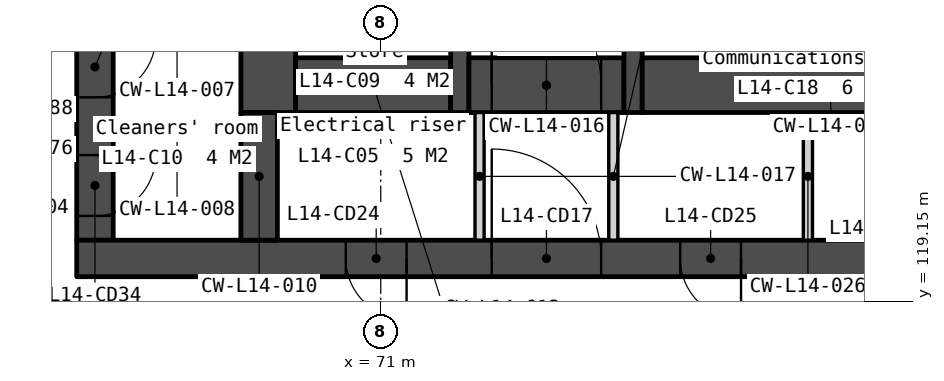
"""IFC4 building model, lengths in metres.
Left out: names, types, materials, properties, quantities, classifications, styles, units other than length and angle.
Written with IfcOpenShell. Run it as: python <this file> out.ifc"""

import sys

from ifc_helpers import new_model, si_unit, direction, frame, frame_2d, origin, place, context, subcontext, project, spatial, polyline, rectangle, outline, extrude, element, fill, save


model = new_model("IFC4")
c1 = context("Model", 3, precision=1e-05, world=origin(), true_north=direction((0.0, 1.0)))
c2 = subcontext(c1, "Body", "Model", "MODEL_VIEW")
j1 = project(units=[si_unit("LENGTHUNIT", "METRE"), si_unit("PLANEANGLEUNIT", "RADIAN")], contexts=[c1])
p1 = place(None, origin())
s1 = spatial("IfcSite", under=j1, at=p1, CompositionType="ELEMENT")
p2 = place(p1, origin())
s2 = spatial("IfcBuilding", under=s1, at=p2, CompositionType="ELEMENT")
p3 = place(p2, frame((0.0, 0.0, 63.0)))
s3 = spatial("IfcBuildingStorey", under=s2, at=p3, CompositionType="ELEMENT", Elevation=63.0)
p4 = place(p3, frame((66.3, 133.95, 0.0), z_axis=(0.0, 0.0, 1.0), x_axis=(0.0, -1.0, 0.0)))
e1 = element("IfcWall", 1, at=p4, inside=s3, PredefinedType="SOLIDWALL", context=c2, shape_type="SweptSolid", body=[
    extrude(rectangle(XDim=13.8, YDim=0.6, at=frame_2d((6.9, 0.0))), origin(), (0.0, 0.0, 1.0), 3.35),
])
p5 = place(p4, frame((0.6, 0.0, 0.0)))
e2 = element("IfcOpeningElement", 2, at=p5, cuts=e1, PredefinedType="OPENING", context=c2, shape_type="SweptSolid", body=[
    extrude(rectangle(XDim=1.1, YDim=2.1, at=frame_2d((0.55, 1.05))), frame((0.0, 0.31, 0.0), z_axis=(0.0, -1.0, 0.0), x_axis=(1.0, 0.0, 0.0)), (0.0, 0.0, 1.0), 0.62),
])
p6 = place(p4, frame((12.4, 0.0, 0.0)))
e3 = element("IfcOpeningElement", 3, at=p6, cuts=e1, PredefinedType="OPENING", context=c2, shape_type="SweptSolid", body=[
    extrude(rectangle(XDim=1.0, YDim=2.1, at=frame_2d((0.5, 1.05))), frame((0.0, 0.31, 0.0), z_axis=(0.0, -1.0, 0.0), x_axis=(1.0, 0.0, 0.0)), (0.0, 0.0, 1.0), 0.62),
])
p7 = place(p4, frame((8.5, 0.0, 0.0)))
e4 = element("IfcOpeningElement", 4, at=p7, cuts=e1, PredefinedType="OPENING", context=c2, shape_type="SweptSolid", body=[
    extrude(rectangle(XDim=1.0, YDim=2.1, at=frame_2d((0.5, 1.05))), frame((0.0, 0.31, 0.0), z_axis=(0.0, -1.0, 0.0), x_axis=(1.0, 0.0, 0.0)), (0.0, 0.0, 1.0), 0.62),
])
p8 = place(p4, frame((10.45, 0.0, 0.0)))
e5 = element("IfcOpeningElement", 5, at=p8, cuts=e1, PredefinedType="OPENING", context=c2, shape_type="SweptSolid", body=[
    extrude(rectangle(XDim=1.0, YDim=2.1, at=frame_2d((0.5, 1.05))), frame((0.0, 0.31, 0.0), z_axis=(0.0, -1.0, 0.0), x_axis=(1.0, 0.0, 0.0)), (0.0, 0.0, 1.0), 0.62),
])
p9 = place(p3, frame((66.0, 119.85, 0.0), z_axis=(0.0, 0.0, 1.0), x_axis=(1.0, 0.0, 0.0)))
e6 = element("IfcWall", 6, at=p9, inside=s3, PredefinedType="SOLIDWALL", context=c2, shape_type="SweptSolid", body=[
    extrude(rectangle(XDim=28.0, YDim=0.6, at=frame_2d((14.0, 0.0))), origin(), (0.0, 0.0, 1.0), 3.35),
])
p10 = place(p9, frame((6.825, 0.0, 0.0)))
e7 = element("IfcOpeningElement", 7, at=p10, cuts=e6, PredefinedType="OPENING", context=c2, shape_type="SweptSolid", body=[
    extrude(rectangle(XDim=1.8, YDim=2.1, at=frame_2d((0.9, 1.05))), frame((0.0, 0.31, 0.0), z_axis=(0.0, -1.0, 0.0), x_axis=(1.0, 0.0, 0.0)), (0.0, 0.0, 1.0), 0.62),
])
p11 = place(p9, frame((15.85, 0.0, 0.0)))
e8 = element("IfcOpeningElement", 8, at=p11, cuts=e6, PredefinedType="OPENING", context=c2, shape_type="SweptSolid", body=[
    extrude(rectangle(XDim=1.5, YDim=2.1, at=frame_2d((0.75, 1.05))), frame((0.0, 0.31, 0.0), z_axis=(0.0, -1.0, 0.0), x_axis=(1.0, 0.0, 0.0)), (0.0, 0.0, 1.0), 0.62),
])
p12 = place(p9, frame((19.375, 0.0, 0.0)))
e9 = element("IfcOpeningElement", 9, at=p12, cuts=e6, PredefinedType="OPENING", context=c2, shape_type="SweptSolid", body=[
    extrude(rectangle(XDim=1.8, YDim=2.1, at=frame_2d((0.9, 1.05))), frame((0.0, 0.31, 0.0), z_axis=(0.0, -1.0, 0.0), x_axis=(1.0, 0.0, 0.0)), (0.0, 0.0, 1.0), 0.62),
])
p13 = place(p9, frame((4.425, 0.0, 0.0)))
e10 = element("IfcOpeningElement", 10, at=p13, cuts=e6, PredefinedType="OPENING", context=c2, shape_type="SweptSolid", body=[
    extrude(rectangle(XDim=1.0, YDim=2.1, at=frame_2d((0.5, 1.05))), frame((0.0, 0.31, 0.0), z_axis=(0.0, -1.0, 0.0), x_axis=(1.0, 0.0, 0.0)), (0.0, 0.0, 1.0), 0.62),
])
p14 = place(p9, frame((9.925, 0.0, 0.0)))
e11 = element("IfcOpeningElement", 11, at=p14, cuts=e6, PredefinedType="OPENING", context=c2, shape_type="SweptSolid", body=[
    extrude(rectangle(XDim=1.0, YDim=2.1, at=frame_2d((0.5, 1.05))), frame((0.0, 0.31, 0.0), z_axis=(0.0, -1.0, 0.0), x_axis=(1.0, 0.0, 0.0)), (0.0, 0.0, 1.0), 0.62),
])
p15 = place(p9, frame((13.125, 0.0, 0.0)))
e12 = element("IfcOpeningElement", 12, at=p15, cuts=e6, PredefinedType="OPENING", context=c2, shape_type="SweptSolid", body=[
    extrude(rectangle(XDim=1.0, YDim=2.1, at=frame_2d((0.5, 1.05))), frame((0.0, 0.31, 0.0), z_axis=(0.0, -1.0, 0.0), x_axis=(1.0, 0.0, 0.0)), (0.0, 0.0, 1.0), 0.62),
])
p16 = place(p9, frame((21.725, 0.0, 0.0)))
e13 = element("IfcOpeningElement", 13, at=p16, cuts=e6, PredefinedType="OPENING", context=c2, shape_type="SweptSolid", body=[
    extrude(rectangle(XDim=1.0, YDim=2.1, at=frame_2d((0.5, 1.05))), frame((0.0, 0.31, 0.0), z_axis=(0.0, -1.0, 0.0), x_axis=(1.0, 0.0, 0.0)), (0.0, 0.0, 1.0), 0.62),
])
p17 = place(p9, frame((23.425, 0.0, 0.0)))
e14 = element("IfcOpeningElement", 14, at=p17, cuts=e6, PredefinedType="OPENING", context=c2, shape_type="SweptSolid", body=[
    extrude(rectangle(XDim=1.0, YDim=2.1, at=frame_2d((0.5, 1.05))), frame((0.0, 0.31, 0.0), z_axis=(0.0, -1.0, 0.0), x_axis=(1.0, 0.0, 0.0)), (0.0, 0.0, 1.0), 0.62),
])
p18 = place(p3, frame((66.6, 122.025, 0.0), z_axis=(0.0, 0.0, 1.0), x_axis=(1.0, 0.0, 0.0)))
e15 = element("IfcWall", 15, at=p18, inside=s3, PredefinedType="PARTITIONING", context=c2, shape_type="SweptSolid", body=[
    extrude(rectangle(XDim=2.1, YDim=0.15, at=frame_2d((1.05, 0.0))), origin(), (0.0, 0.0, 1.0), 3.35),
])
p19 = place(p3, frame((69.15, 133.95, 0.0), z_axis=(0.0, 0.0, 1.0), x_axis=(0.0, -1.0, 0.0)))
e16 = element("IfcWall", 16, at=p19, inside=s3, PredefinedType="SOLIDWALL", context=c2, shape_type="SweptSolid", body=[
    extrude(rectangle(XDim=11.7, YDim=0.9, at=frame_2d((5.85, 0.0))), origin(), (0.0, 0.0, 1.0), 3.35),
])
p20 = place(p3, frame((69.0, 122.25, 0.0), z_axis=(0.0, 0.0, 1.0), x_axis=(0.0, -1.0, 0.0)))
e17 = element("IfcWall", 17, at=p20, inside=s3, PredefinedType="SOLIDWALL", context=c2, shape_type="SweptSolid", body=[
    extrude(rectangle(XDim=2.1, YDim=0.6, at=frame_2d((1.05, 0.0))), origin(), (0.0, 0.0, 1.0), 3.35),
])
p21 = place(p3, frame((69.6, 122.7, 0.0), z_axis=(0.0, 0.0, 1.0), x_axis=(1.0, 0.0, 0.0)))
e18 = element("IfcWall", 18, at=p21, inside=s3, PredefinedType="SOLIDWALL", context=c2, shape_type="SweptSolid", body=[
    extrude(rectangle(XDim=2.55, YDim=0.9, at=frame_2d((1.275, 0.0))), origin(), (0.0, 0.0, 1.0), 3.35),
])
p22 = place(p3, frame((72.3, 133.95, 0.0), z_axis=(0.0, 0.0, 1.0), x_axis=(0.0, -1.0, 0.0)))
e19 = element("IfcWall", 19, at=p22, inside=s3, PredefinedType="SOLIDWALL", context=c2, shape_type="SweptSolid", body=[
    extrude(rectangle(XDim=11.7, YDim=0.3, at=frame_2d((5.85, 0.0))), origin(), (0.0, 0.0, 1.0), 3.35),
])
p23 = place(p22, frame((6.95, 0.0, 0.0)))
e20 = element("IfcOpeningElement", 20, at=p23, cuts=e19, PredefinedType="OPENING", context=c2, shape_type="SweptSolid", body=[
    extrude(rectangle(XDim=1.1, YDim=2.1, at=frame_2d((0.55, 1.05))), frame((0.0, 0.16, 0.0), z_axis=(0.0, -1.0, 0.0), x_axis=(1.0, 0.0, 0.0)), (0.0, 0.0, 1.0), 0.32),
])
p24 = place(p22, frame((9.35, 0.0, 0.0)))
e21 = element("IfcOpeningElement", 21, at=p24, cuts=e19, PredefinedType="OPENING", context=c2, shape_type="SweptSolid", body=[
    extrude(rectangle(XDim=0.9, YDim=2.1, at=frame_2d((0.45, 1.05))), frame((0.0, 0.16, 0.0), z_axis=(0.0, -1.0, 0.0), x_axis=(1.0, 0.0, 0.0)), (0.0, 0.0, 1.0), 0.32),
])
p25 = place(p22, frame((5.1, 0.0, 0.0)))
e22 = element("IfcOpeningElement", 22, at=p25, cuts=e19, PredefinedType="OPENING", context=c2, shape_type="SweptSolid", body=[
    extrude(rectangle(XDim=1.0, YDim=2.1, at=frame_2d((0.5, 1.05))), frame((0.0, 0.16, 0.0), z_axis=(0.0, -1.0, 0.0), x_axis=(1.0, 0.0, 0.0)), (0.0, 0.0, 1.0), 0.32),
])
p26 = place(p3, frame((72.45, 122.7, 0.0), z_axis=(0.0, 0.0, 1.0), x_axis=(1.0, 0.0, 0.0)))
e23 = element("IfcWall", 23, at=p26, inside=s3, PredefinedType="SOLIDWALL", context=c2, shape_type="SweptSolid", body=[
    extrude(rectangle(XDim=2.55, YDim=0.9, at=frame_2d((1.275, 0.0))), origin(), (0.0, 0.0, 1.0), 3.35),
])
p27 = place(p26, frame((0.375, 0.0, 0.0)))
e24 = element("IfcOpeningElement", 24, at=p27, cuts=e23, PredefinedType="OPENING", context=c2, shape_type="SweptSolid", body=[
    extrude(rectangle(XDim=1.8, YDim=2.1, at=frame_2d((0.9, 1.05))), frame((0.0, 0.46, 0.0), z_axis=(0.0, -1.0, 0.0), x_axis=(1.0, 0.0, 0.0)), (0.0, 0.0, 1.0), 0.92),
])
for number, where, z_axis, x_axis in (
    (25, (72.625, 122.25, 0.0), (0.0, 0.0, 1.0), (0.0, -1.0, 0.0)),
    (26, (74.825, 122.25, 0.0), (0.0, 0.0, 1.0), (0.0, -1.0, 0.0)),
):
    element("IfcWall", number, at=place(p3, frame(where, z_axis=z_axis, x_axis=x_axis)), inside=s3, PredefinedType="PARTITIONING", context=c2, shape_type="SweptSolid", body=[
        extrude(rectangle(XDim=2.1, YDim=0.15, at=frame_2d((1.05, 0.0))), origin(), (0.0, 0.0, 1.0), 3.35),
    ])
p28 = place(p3, frame((75.15, 133.95, 0.0), z_axis=(0.0, 0.0, 1.0), x_axis=(0.0, -1.0, 0.0)))
e27 = element("IfcWall", 27, at=p28, inside=s3, PredefinedType="SOLIDWALL", context=c2, shape_type="SweptSolid", body=[
    extrude(rectangle(XDim=11.7, YDim=0.3, at=frame_2d((5.85, 0.0))), origin(), (0.0, 0.0, 1.0), 3.35),
])
p29 = place(p3, frame((75.3, 122.7, 0.0), z_axis=(0.0, 0.0, 1.0), x_axis=(1.0, 0.0, 0.0)))
e28 = element("IfcWall", 28, at=p29, inside=s3, PredefinedType="SOLIDWALL", context=c2, shape_type="SweptSolid", body=[
    extrude(rectangle(XDim=6.2, YDim=0.9, at=frame_2d((3.1, 0.0))), origin(), (0.0, 0.0, 1.0), 3.35),
])
p30 = place(p3, frame((78.025, 122.25, 0.0), z_axis=(0.0, 0.0, 1.0), x_axis=(0.0, -1.0, 0.0)))
e29 = element("IfcWall", 29, at=p30, inside=s3, PredefinedType="PARTITIONING", context=c2, shape_type="SweptSolid", body=[
    extrude(rectangle(XDim=2.1, YDim=0.15, at=frame_2d((1.05, 0.0))), origin(), (0.0, 0.0, 1.0), 3.35),
])
p31 = place(p3, frame((54.495, 129.397, -0.15), z_axis=(0.0, 0.0, 1.0), x_axis=(0.499999201451, -0.866025864826, 0.0)))
e30 = element("IfcWall", 30, at=p31, inside=s3, PredefinedType="SOLIDWALL", context=c2, shape_type="SweptSolid", body=[
    extrude(outline(polyline([(44.8, 0.0), (44.8, 3.5), (0.0, 3.5), (0.0, 0.0), (44.8, 0.0)])), frame((0.0, 0.225, 0.0), z_axis=(0.0, -1.0, 0.0), x_axis=(1.0, 0.0, 0.0)), (0.0, 0.0, 1.0), 0.45),
])
p32 = place(p31, frame((2.43, 0.0, 1.05)))
e31 = element("IfcOpeningElement", 31, at=p32, cuts=e30, PredefinedType="OPENING", context=c2, shape_type="SweptSolid", body=[
    extrude(rectangle(XDim=1.8, YDim=1.5, at=frame_2d((0.9, 0.75))), frame((0.0, 0.235, 0.0), z_axis=(0.0, -1.0, 0.0), x_axis=(1.0, 0.0, 0.0)), (0.0, 0.0, 1.0), 0.47),
])
p33 = place(p31, frame((4.73, 0.0, 1.05)))
e32 = element("IfcOpeningElement", 32, at=p33, cuts=e30, PredefinedType="OPENING", context=c2, shape_type="SweptSolid", body=[
    extrude(rectangle(XDim=1.8, YDim=1.5, at=frame_2d((0.9, 0.75))), frame((0.0, 0.235, 0.0), z_axis=(0.0, -1.0, 0.0), x_axis=(1.0, 0.0, 0.0)), (0.0, 0.0, 1.0), 0.47),
])
p34 = place(p31, frame((11.39, 0.0, 1.05)))
e33 = element("IfcOpeningElement", 33, at=p34, cuts=e30, PredefinedType="OPENING", context=c2, shape_type="SweptSolid", body=[
    extrude(rectangle(XDim=1.8, YDim=1.5, at=frame_2d((0.9, 0.75))), frame((0.0, 0.235, 0.0), z_axis=(0.0, -1.0, 0.0), x_axis=(1.0, 0.0, 0.0)), (0.0, 0.0, 1.0), 0.47),
])
p35 = place(p31, frame((13.69, 0.0, 1.05)))
e34 = element("IfcOpeningElement", 34, at=p35, cuts=e30, PredefinedType="OPENING", context=c2, shape_type="SweptSolid", body=[
    extrude(rectangle(XDim=1.8, YDim=1.5, at=frame_2d((0.9, 0.75))), frame((0.0, 0.235, 0.0), z_axis=(0.0, -1.0, 0.0), x_axis=(1.0, 0.0, 0.0)), (0.0, 0.0, 1.0), 0.47),
])
p36 = place(p31, frame((20.35, 0.0, 1.05)))
e35 = element("IfcOpeningElement", 35, at=p36, cuts=e30, PredefinedType="OPENING", context=c2, shape_type="SweptSolid", body=[
    extrude(rectangle(XDim=1.8, YDim=1.5, at=frame_2d((0.9, 0.75))), frame((0.0, 0.235, 0.0), z_axis=(0.0, -1.0, 0.0), x_axis=(1.0, 0.0, 0.0)), (0.0, 0.0, 1.0), 0.47),
])
p37 = place(p31, frame((22.65, 0.0, 1.05)))
e36 = element("IfcOpeningElement", 36, at=p37, cuts=e30, PredefinedType="OPENING", context=c2, shape_type="SweptSolid", body=[
    extrude(rectangle(XDim=1.8, YDim=1.5, at=frame_2d((0.9, 0.75))), frame((0.0, 0.235, 0.0), z_axis=(0.0, -1.0, 0.0), x_axis=(1.0, 0.0, 0.0)), (0.0, 0.0, 1.0), 0.47),
])
p38 = place(p31, frame((29.31, 0.0, 1.05)))
e37 = element("IfcOpeningElement", 37, at=p38, cuts=e30, PredefinedType="OPENING", context=c2, shape_type="SweptSolid", body=[
    extrude(rectangle(XDim=1.8, YDim=1.5, at=frame_2d((0.9, 0.75))), frame((0.0, 0.235, 0.0), z_axis=(0.0, -1.0, 0.0), x_axis=(1.0, 0.0, 0.0)), (0.0, 0.0, 1.0), 0.47),
])
p39 = place(p31, frame((31.61, 0.0, 1.05)))
e38 = element("IfcOpeningElement", 38, at=p39, cuts=e30, PredefinedType="OPENING", context=c2, shape_type="SweptSolid", body=[
    extrude(rectangle(XDim=1.8, YDim=1.5, at=frame_2d((0.9, 0.75))), frame((0.0, 0.235, 0.0), z_axis=(0.0, -1.0, 0.0), x_axis=(1.0, 0.0, 0.0)), (0.0, 0.0, 1.0), 0.47),
])
p40 = place(p31, frame((38.27, 0.0, 1.05)))
e39 = element("IfcOpeningElement", 39, at=p40, cuts=e30, PredefinedType="OPENING", context=c2, shape_type="SweptSolid", body=[
    extrude(rectangle(XDim=1.8, YDim=1.5, at=frame_2d((0.9, 0.75))), frame((0.0, 0.235, 0.0), z_axis=(0.0, -1.0, 0.0), x_axis=(1.0, 0.0, 0.0)), (0.0, 0.0, 1.0), 0.47),
])
p41 = place(p31, frame((40.57, 0.0, 1.05)))
e40 = element("IfcOpeningElement", 40, at=p41, cuts=e30, PredefinedType="OPENING", context=c2, shape_type="SweptSolid", body=[
    extrude(rectangle(XDim=1.8, YDim=1.5, at=frame_2d((0.9, 0.75))), frame((0.0, 0.235, 0.0), z_axis=(0.0, -1.0, 0.0), x_axis=(1.0, 0.0, 0.0)), (0.0, 0.0, 1.0), 0.47),
])
p42 = place(p27, origin())
e41 = element("IfcDoor", 41, at=p42, inside=s3, OperationType="DOUBLE_DOOR_DOUBLE_SWING", PredefinedType="DOOR", context=c2, shape_type="SweptSolid", body=[
    extrude(rectangle(XDim=1.8, YDim=2.1, at=frame_2d((0.9, 1.05))), frame((0.0, 0.025, 0.0), z_axis=(0.0, -1.0, 0.0), x_axis=(1.0, 0.0, 0.0)), (0.0, 0.0, 1.0), 0.05),
])
fill(e24, e41)
p43 = place(p10, origin())
e42 = element("IfcDoor", 42, at=p43, inside=s3, OperationType="DOUBLE_DOOR_DOUBLE_SWING", PredefinedType="DOOR", context=c2, shape_type="SweptSolid", body=[
    extrude(rectangle(XDim=1.8, YDim=2.1, at=frame_2d((0.9, 1.05))), frame((0.0, 0.025, 0.0), z_axis=(0.0, -1.0, 0.0), x_axis=(1.0, 0.0, 0.0)), (0.0, 0.0, 1.0), 0.05),
])
fill(e7, e42)
p44 = place(p13, origin())
e43 = element("IfcDoor", 43, at=p44, inside=s3, OperationType="SINGLE_SWING_RIGHT", PredefinedType="DOOR", context=c2, shape_type="SweptSolid", body=[
    extrude(rectangle(XDim=1.0, YDim=2.1, at=frame_2d((0.5, 1.05))), frame((0.0, 0.025, 0.0), z_axis=(0.0, -1.0, 0.0), x_axis=(1.0, 0.0, 0.0)), (0.0, 0.0, 1.0), 0.05),
])
fill(e10, e43)
p45 = place(p14, origin())
e44 = element("IfcDoor", 44, at=p45, inside=s3, OperationType="SINGLE_SWING_RIGHT", PredefinedType="DOOR", context=c2, shape_type="SweptSolid", body=[
    extrude(rectangle(XDim=1.0, YDim=2.1, at=frame_2d((0.5, 1.05))), frame((0.0, 0.025, 0.0), z_axis=(0.0, -1.0, 0.0), x_axis=(1.0, 0.0, 0.0)), (0.0, 0.0, 1.0), 0.05),
])
fill(e11, e44)
p46 = place(p6, origin())
e45 = element("IfcDoor", 45, at=p46, inside=s3, OperationType="SINGLE_SWING_LEFT", PredefinedType="DOOR", context=c2, shape_type="SweptSolid", body=[
    extrude(rectangle(XDim=1.0, YDim=2.1, at=frame_2d((0.5, 1.05))), frame((0.0, 0.025, 0.0), z_axis=(0.0, -1.0, 0.0), x_axis=(1.0, 0.0, 0.0)), (0.0, 0.0, 1.0), 0.05),
])
fill(e3, e45)
p47 = place(p8, origin())
e46 = element("IfcDoor", 46, at=p47, inside=s3, OperationType="SINGLE_SWING_LEFT", PredefinedType="DOOR", context=c2, shape_type="SweptSolid", body=[
    extrude(rectangle(XDim=1.0, YDim=2.1, at=frame_2d((0.5, 1.05))), frame((0.0, 0.025, 0.0), z_axis=(0.0, -1.0, 0.0), x_axis=(1.0, 0.0, 0.0)), (0.0, 0.0, 1.0), 0.05),
])
fill(e5, e46)
save(model, sys.argv[1])
